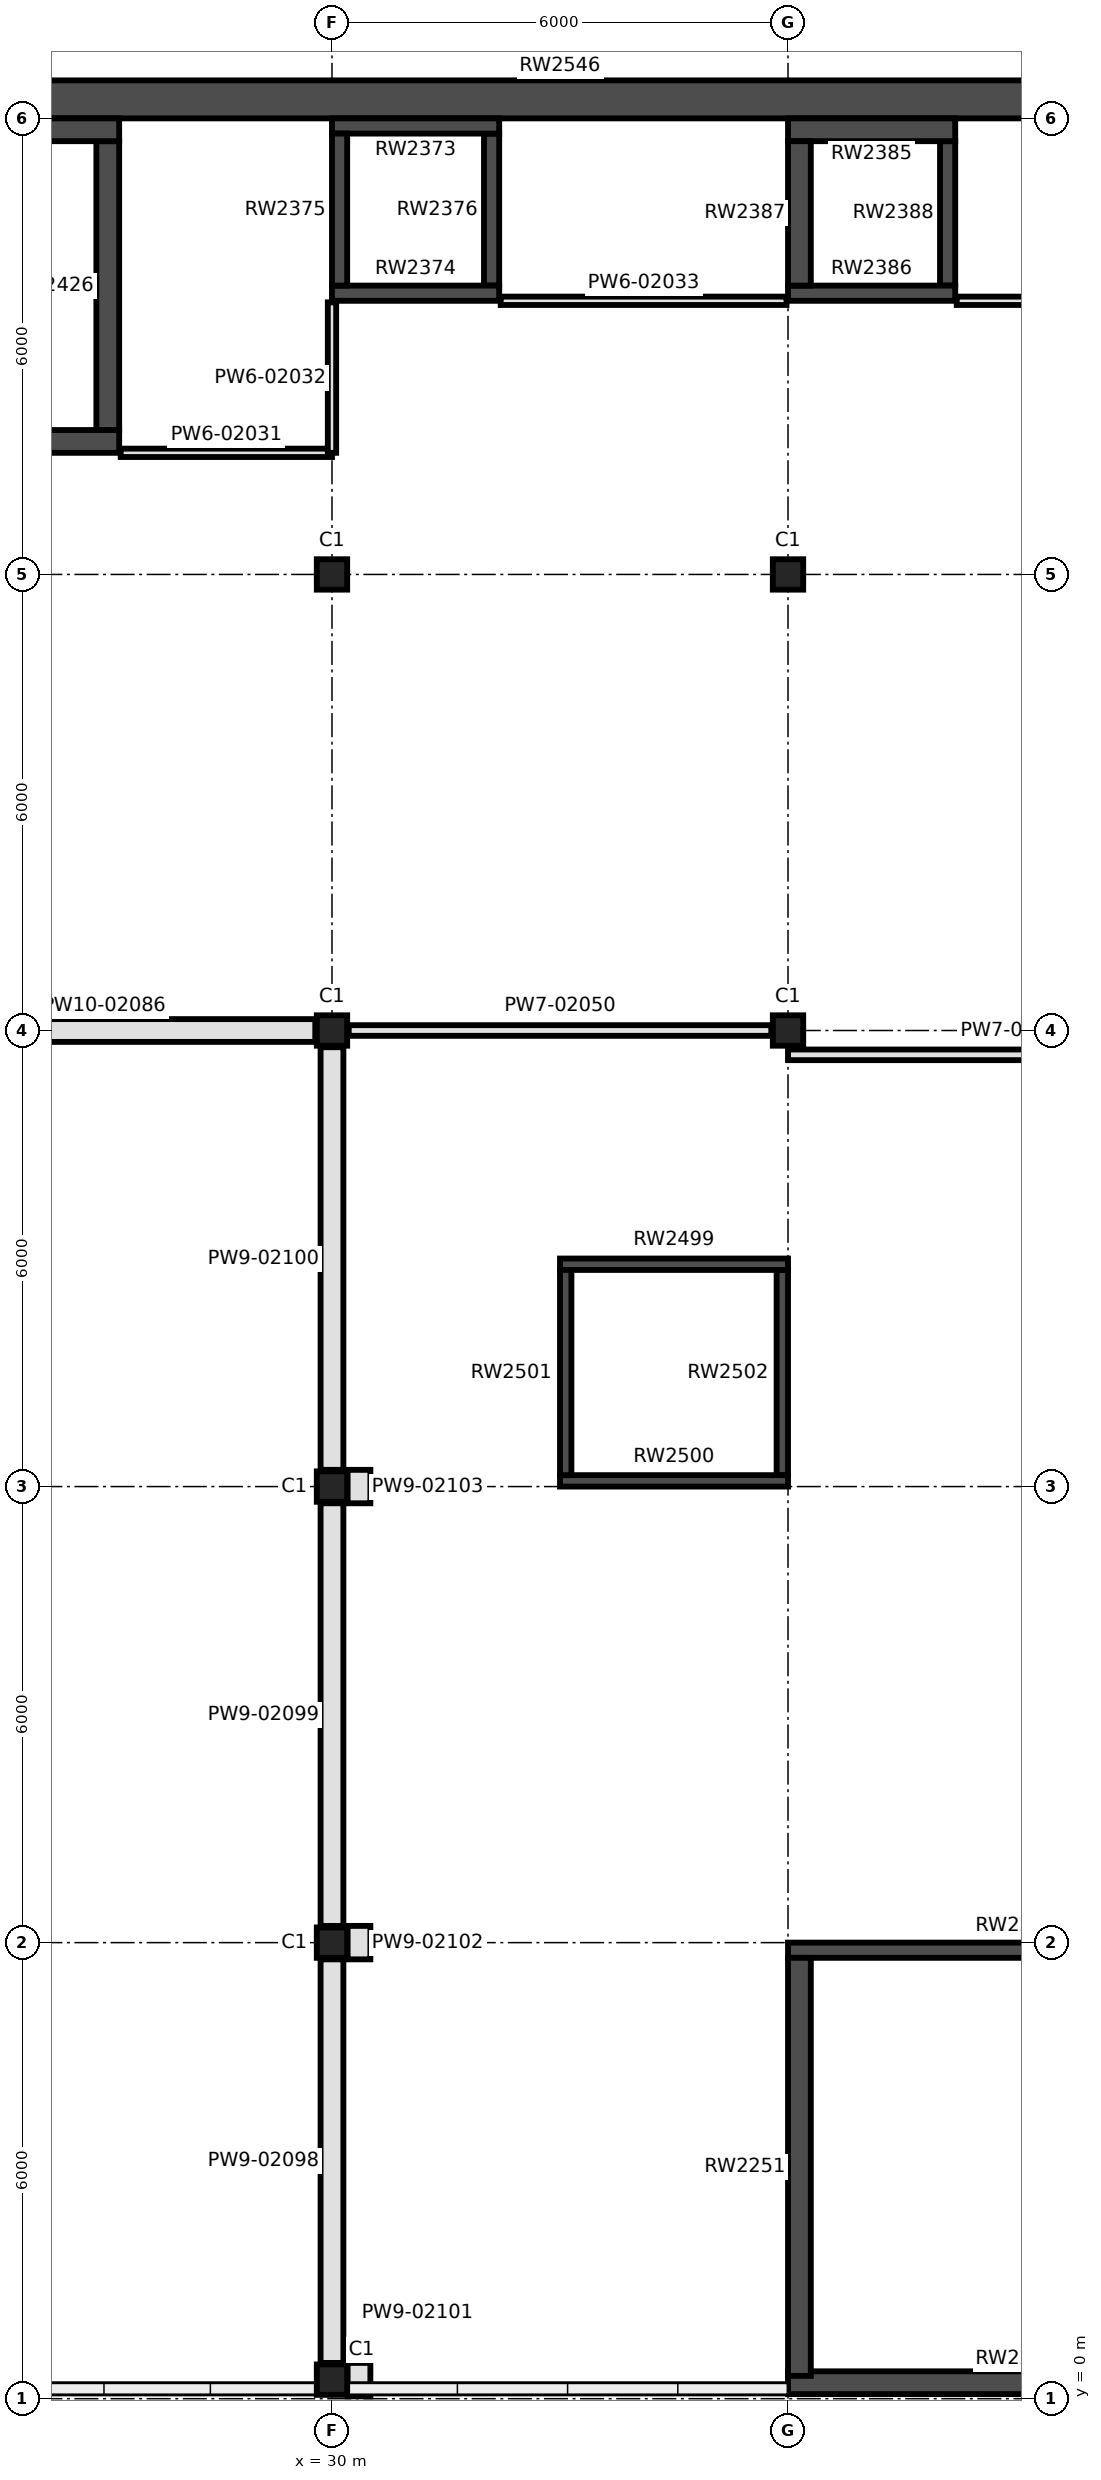
"""IFC4 building model, lengths in metres.
Left out: names, types, materials, properties, quantities, classifications, styles, units other than length and angle.
Written with IfcOpenShell. Run it as: python <this file> out.ifc"""

import sys

from ifc_helpers import new_model, si_unit, direction, frame, frame_2d, origin, origin_2d, place, context, subcontext, project, spatial, rectangle, extrude, element, fill, save


model = new_model("IFC4")
c1 = context("Model", 3, precision=1e-05, world=origin(), true_north=direction((0.0, 1.0)))
c2 = subcontext(c1, "Body", "Model", "MODEL_VIEW")
j1 = project(units=[si_unit("LENGTHUNIT", "METRE"), si_unit("PLANEANGLEUNIT", "RADIAN")], contexts=[c1])
p1 = place(None, origin())
s1 = spatial("IfcSite", under=j1, at=p1, CompositionType="ELEMENT")
p2 = place(p1, origin())
s2 = spatial("IfcBuilding", under=s1, at=p2, CompositionType="ELEMENT")
p3 = place(p2, frame((0.0, 0.0, 12.0)))
s3 = spatial("IfcBuildingStorey", under=s2, at=p3, CompositionType="ELEMENT", Elevation=12.0)
for number, where, z_axis, x_axis in (
    (1, (30.0, 0.25, 0.0), (0.0, 0.0, 1.0), (1.0, 0.0, 0.0)),
    (2, (30.0, 6.0, 0.0), (0.0, 0.0, 1.0), (1.0, 0.0, 0.0)),
    (3, (30.0, 12.0, 0.0), (0.0, 0.0, 1.0), (1.0, 0.0, 0.0)),
    (4, (30.0, 18.0, 0.0), (0.0, 0.0, 1.0), (1.0, 0.0, 0.0)),
    (5, (36.0, 18.0, 0.0), (0.0, 0.0, 1.0), (1.0, 0.0, 0.0)),
    (6, (30.0, 24.0, 0.0), (0.0, 0.0, 1.0), (1.0, 0.0, 0.0)),
    (7, (36.0, 24.0, 0.0), (0.0, 0.0, 1.0), (1.0, 0.0, 0.0)),
):
    element("IfcColumn", number, at=place(p3, frame(where, z_axis=z_axis, x_axis=x_axis)), inside=s3, PredefinedType="COLUMN", context=c2, shape_type="SweptSolid", body=[
        extrude(rectangle(XDim=0.4, YDim=0.4, at=origin_2d()), origin(), (0.0, 0.0, 1.0), 4.5),
    ])
p4 = place(p3, frame((36.0, 5.9, 0.0), z_axis=(0.0, 0.0, 1.0), x_axis=(1.0, 0.0, 0.0)))
e8 = element("IfcWall", 8, at=p4, inside=s3, PredefinedType="SHEAR", context=c2, shape_type="SweptSolid", body=[
    extrude(rectangle(XDim=6.0, YDim=0.2, at=frame_2d((3.0, 0.0))), origin(), (0.0, 0.0, 1.0), 4.5),
])
p5 = place(p4, frame((0.3, 0.0, 0.0)))
e9 = element("IfcOpeningElement", 9, at=p5, cuts=e8, PredefinedType="OPENING", context=c2, shape_type="SweptSolid", body=[
    extrude(rectangle(XDim=1.1, YDim=2.2, at=frame_2d((0.55, 1.1))), frame((0.0, 0.11, 0.0), z_axis=(0.0, -1.0, 0.0), x_axis=(1.0, 0.0, 0.0)), (0.0, 0.0, 1.0), 0.22),
])
p6 = place(p3, frame((36.0, 0.21, 0.0), z_axis=(0.0, 0.0, 1.0), x_axis=(1.0, 0.0, 0.0)))
e10 = element("IfcWall", 10, at=p6, inside=s3, PredefinedType="SHEAR", context=c2, shape_type="SweptSolid", body=[
    extrude(rectangle(XDim=6.0, YDim=0.3, at=frame_2d((3.0, 0.0))), origin(), (0.0, 0.0, 1.0), 4.5),
])
p7 = place(p3, frame((36.15, 0.3, 0.0), z_axis=(0.0, 0.0, 1.0), x_axis=(0.0, 1.0, 0.0)))
e11 = element("IfcWall", 11, at=p7, inside=s3, PredefinedType="SHEAR", context=c2, shape_type="SweptSolid", body=[
    extrude(rectangle(XDim=5.5, YDim=0.3, at=frame_2d((2.75, 0.0))), origin(), (0.0, 0.0, 1.0), 4.5),
])
p8 = place(p7, frame((1.8, 0.0, 0.0)))
e12 = element("IfcOpeningElement", 12, at=p8, cuts=e11, PredefinedType="OPENING", context=c2, shape_type="SweptSolid", body=[
    extrude(rectangle(XDim=1.8, YDim=2.2, at=frame_2d((0.9, 1.1))), frame((0.0, 0.16, 0.0), z_axis=(0.0, -1.0, 0.0), x_axis=(1.0, 0.0, 0.0)), (0.0, 0.0, 1.0), 0.32),
])
p9 = place(p3, frame((30.0, 29.9, 0.0), z_axis=(0.0, 0.0, 1.0), x_axis=(1.0, 0.0, 0.0)))
e13 = element("IfcWall", 13, at=p9, inside=s3, PredefinedType="SHEAR", context=c2, shape_type="SweptSolid", body=[
    extrude(rectangle(XDim=2.2, YDim=0.2, at=frame_2d((1.1, 0.0))), origin(), (0.0, 0.0, 1.0), 4.5),
])
p10 = place(p3, frame((30.0, 27.7, 0.0), z_axis=(0.0, 0.0, 1.0), x_axis=(1.0, 0.0, 0.0)))
e14 = element("IfcWall", 14, at=p10, inside=s3, PredefinedType="SHEAR", context=c2, shape_type="SweptSolid", body=[
    extrude(rectangle(XDim=2.2, YDim=0.2, at=frame_2d((1.1, 0.0))), origin(), (0.0, 0.0, 1.0), 4.5),
])
p11 = place(p10, frame((0.55, 0.0, 0.0)))
e15 = element("IfcOpeningElement", 15, at=p11, cuts=e14, PredefinedType="OPENING", context=c2, shape_type="SweptSolid", body=[
    extrude(rectangle(XDim=1.1, YDim=2.1, at=frame_2d((0.55, 1.05))), frame((0.0, 0.11, 0.0), z_axis=(0.0, -1.0, 0.0), x_axis=(1.0, 0.0, 0.0)), (0.0, 0.0, 1.0), 0.22),
])
for number, where, z_axis, x_axis in (
    (16, (30.1, 27.8, 0.0), (0.0, 0.0, 1.0), (0.0, 1.0, 0.0)),
    (17, (32.1, 27.8, 0.0), (0.0, 0.0, 1.0), (0.0, 1.0, 0.0)),
):
    element("IfcWall", number, at=place(p3, frame(where, z_axis=z_axis, x_axis=x_axis)), inside=s3, PredefinedType="SHEAR", context=c2, shape_type="SweptSolid", body=[
        extrude(rectangle(XDim=2.0, YDim=0.2, at=frame_2d((1.0, 0.0))), origin(), (0.0, 0.0, 1.0), 4.5),
    ])
p12 = place(p3, frame((36.0, 29.85, 0.0), z_axis=(0.0, 0.0, 1.0), x_axis=(1.0, 0.0, 0.0)))
e18 = element("IfcWall", 18, at=p12, inside=s3, PredefinedType="SHEAR", context=c2, shape_type="SweptSolid", body=[
    extrude(rectangle(XDim=2.2, YDim=0.3, at=frame_2d((1.1, 0.0))), origin(), (0.0, 0.0, 1.0), 4.5),
])
p13 = place(p3, frame((36.0, 27.7, 0.0), z_axis=(0.0, 0.0, 1.0), x_axis=(1.0, 0.0, 0.0)))
e19 = element("IfcWall", 19, at=p13, inside=s3, PredefinedType="SHEAR", context=c2, shape_type="SweptSolid", body=[
    extrude(rectangle(XDim=2.2, YDim=0.2, at=frame_2d((1.1, 0.0))), origin(), (0.0, 0.0, 1.0), 4.5),
])
p14 = place(p13, frame((0.55, 0.0, 0.0)))
e20 = element("IfcOpeningElement", 20, at=p14, cuts=e19, PredefinedType="OPENING", context=c2, shape_type="SweptSolid", body=[
    extrude(rectangle(XDim=1.1, YDim=2.1, at=frame_2d((0.55, 1.05))), frame((0.0, 0.11, 0.0), z_axis=(0.0, -1.0, 0.0), x_axis=(1.0, 0.0, 0.0)), (0.0, 0.0, 1.0), 0.22),
])
p15 = place(p3, frame((36.15, 27.8, 0.0), z_axis=(0.0, 0.0, 1.0), x_axis=(0.0, 1.0, 0.0)))
e21 = element("IfcWall", 21, at=p15, inside=s3, PredefinedType="SHEAR", context=c2, shape_type="SweptSolid", body=[
    extrude(rectangle(XDim=1.9, YDim=0.3, at=frame_2d((0.95, 0.0))), origin(), (0.0, 0.0, 1.0), 4.5),
])
p16 = place(p3, frame((38.1, 27.8, 0.0), z_axis=(0.0, 0.0, 1.0), x_axis=(0.0, 1.0, 0.0)))
e22 = element("IfcWall", 22, at=p16, inside=s3, PredefinedType="SHEAR", context=c2, shape_type="SweptSolid", body=[
    extrude(rectangle(XDim=1.9, YDim=0.2, at=frame_2d((0.95, 0.0))), origin(), (0.0, 0.0, 1.0), 4.5),
])
p17 = place(p3, frame((24.0, 29.85, 0.0), z_axis=(0.0, 0.0, 1.0), x_axis=(1.0, 0.0, 0.0)))
e23 = element("IfcWall", 23, at=p17, inside=s3, PredefinedType="SHEAR", context=c2, shape_type="SweptSolid", body=[
    extrude(rectangle(XDim=3.2, YDim=0.3, at=frame_2d((1.6, 0.0))), origin(), (0.0, 0.0, 1.0), 4.5),
])
p18 = place(p3, frame((24.0, 25.75, 0.0), z_axis=(0.0, 0.0, 1.0), x_axis=(1.0, 0.0, 0.0)))
e24 = element("IfcWall", 24, at=p18, inside=s3, PredefinedType="SHEAR", context=c2, shape_type="SweptSolid", body=[
    extrude(rectangle(XDim=3.2, YDim=0.3, at=frame_2d((1.6, 0.0))), origin(), (0.0, 0.0, 1.0), 4.5),
])
p19 = place(p18, frame((0.4, 0.0, 0.0)))
e25 = element("IfcOpeningElement", 25, at=p19, cuts=e24, PredefinedType="OPENING", context=c2, shape_type="SweptSolid", body=[
    extrude(rectangle(XDim=2.4, YDim=2.4, at=frame_2d((1.2, 1.2))), frame((0.0, 0.16, 0.0), z_axis=(0.0, -1.0, 0.0), x_axis=(1.0, 0.0, 0.0)), (0.0, 0.0, 1.0), 0.32),
])
p20 = place(p3, frame((27.05, 25.9, 0.0), z_axis=(0.0, 0.0, 1.0), x_axis=(0.0, 1.0, 0.0)))
e26 = element("IfcWall", 26, at=p20, inside=s3, PredefinedType="SHEAR", context=c2, shape_type="SweptSolid", body=[
    extrude(rectangle(XDim=3.8, YDim=0.3, at=frame_2d((1.9, 0.0))), origin(), (0.0, 0.0, 1.0), 4.5),
])
for number, where, z_axis, x_axis in (
    (27, (33.0, 14.925, 0.0), (0.0, 0.0, 1.0), (1.0, 0.0, 0.0)),
    (28, (33.0, 12.075, 0.0), (0.0, 0.0, 1.0), (1.0, 0.0, 0.0)),
):
    element("IfcWall", number, at=place(p3, frame(where, z_axis=z_axis, x_axis=x_axis)), inside=s3, PredefinedType="SHEAR", context=c2, shape_type="SweptSolid", body=[
        extrude(rectangle(XDim=3.0, YDim=0.15, at=frame_2d((1.5, 0.0))), origin(), (0.0, 0.0, 1.0), 4.5),
    ])
for number, where, z_axis, x_axis in (
    (29, (33.075, 12.15, 0.0), (0.0, 0.0, 1.0), (0.0, 1.0, 0.0)),
    (30, (35.925, 12.15, 0.0), (0.0, 0.0, 1.0), (0.0, 1.0, 0.0)),
):
    element("IfcWall", number, at=place(p3, frame(where, z_axis=z_axis, x_axis=x_axis)), inside=s3, PredefinedType="SHEAR", context=c2, shape_type="SweptSolid", body=[
        extrude(rectangle(XDim=2.7, YDim=0.15, at=frame_2d((1.35, 0.0))), origin(), (0.0, 0.0, 1.0), 4.5),
    ])
p21 = place(p3, frame((18.5, 30.25, 0.0), z_axis=(0.0, 0.0, 1.0), x_axis=(1.0, 0.0, 0.0)))
e31 = element("IfcWall", 31, at=p21, inside=s3, PredefinedType="SHEAR", context=c2, shape_type="SweptSolid", body=[
    extrude(rectangle(XDim=29.0, YDim=0.5, at=frame_2d((14.5, 0.0))), origin(), (0.0, 0.0, 1.0), 4.5),
])
p22 = place(p2, frame((0.0, 0.0, 7.0)))
s4 = spatial("IfcBuildingStorey", under=s2, at=p22, CompositionType="ELEMENT", Elevation=7.0)
p23 = place(p22, frame((29.8, 0.375, 0.0), z_axis=(0.0, 0.0, 1.0), x_axis=(-1.0, 0.0, 0.0)))
e32 = element("IfcWall", 32, at=p23, inside=s4, PredefinedType="SOLIDWALL", context=c2, shape_type="SweptSolid", body=[
    extrude(rectangle(XDim=5.6, YDim=0.25, at=frame_2d((2.8, 0.0))), origin(), (0.0, 0.0, 1.0), 8.9),
])
p24 = place(p3, frame((27.22, 25.6, 0.0), z_axis=(0.0, 0.0, 1.0), x_axis=(1.0, 0.0, 0.0)))
e33 = element("IfcWall", 33, at=p24, inside=s3, PredefinedType="PARTITIONING", context=c2, shape_type="SweptSolid", body=[
    extrude(rectangle(XDim=2.78, YDim=0.11, at=frame_2d((1.39, 0.0))), origin(), (0.0, 0.0, 1.0), 4.28),
])
p25 = place(p24, frame((1.03, 0.0, 0.0)))
e34 = element("IfcOpeningElement", 34, at=p25, cuts=e33, PredefinedType="OPENING", context=c2, shape_type="SweptSolid", body=[
    extrude(rectangle(XDim=0.75, YDim=2.04, at=frame_2d((0.375, 1.02))), frame((0.0, 0.065, 0.0), z_axis=(0.0, -1.0, 0.0), x_axis=(1.0, 0.0, 0.0)), (0.0, 0.0, 1.0), 0.13),
])
p26 = place(p3, frame((30.0, 25.6, 0.0), z_axis=(0.0, 0.0, 1.0), x_axis=(0.0, 1.0, 0.0)))
e35 = element("IfcWall", 35, at=p26, inside=s3, PredefinedType="PARTITIONING", context=c2, shape_type="SweptSolid", body=[
    extrude(rectangle(XDim=1.98, YDim=0.11, at=frame_2d((0.99, 0.0))), origin(), (0.0, 0.0, 1.0), 4.28),
])
p27 = place(p3, frame((32.22, 27.6, 0.0), z_axis=(0.0, 0.0, 1.0), x_axis=(1.0, 0.0, 0.0)))
e36 = element("IfcWall", 36, at=p27, inside=s3, PredefinedType="PARTITIONING", context=c2, shape_type="SweptSolid", body=[
    extrude(rectangle(XDim=3.76, YDim=0.11, at=frame_2d((1.88, 0.0))), origin(), (0.0, 0.0, 1.0), 4.28),
])
p28 = place(p27, frame((1.53, 0.0, 0.0)))
e37 = element("IfcOpeningElement", 37, at=p28, cuts=e36, PredefinedType="OPENING", context=c2, shape_type="SweptSolid", body=[
    extrude(rectangle(XDim=0.75, YDim=2.04, at=frame_2d((0.375, 1.02))), frame((0.0, 0.065, 0.0), z_axis=(0.0, -1.0, 0.0), x_axis=(1.0, 0.0, 0.0)), (0.0, 0.0, 1.0), 0.13),
])
p29 = place(p3, frame((38.22, 27.6, 0.0), z_axis=(0.0, 0.0, 1.0), x_axis=(1.0, 0.0, 0.0)))
e38 = element("IfcWall", 38, at=p29, inside=s3, PredefinedType="PARTITIONING", context=c2, shape_type="SweptSolid", body=[
    extrude(rectangle(XDim=3.78, YDim=0.11, at=frame_2d((1.89, 0.0))), origin(), (0.0, 0.0, 1.0), 4.28),
])
p30 = place(p29, frame((1.53, 0.0, 0.0)))
e39 = element("IfcOpeningElement", 39, at=p30, cuts=e38, PredefinedType="OPENING", context=c2, shape_type="SweptSolid", body=[
    extrude(rectangle(XDim=0.75, YDim=2.04, at=frame_2d((0.375, 1.02))), frame((0.0, 0.065, 0.0), z_axis=(0.0, -1.0, 0.0), x_axis=(1.0, 0.0, 0.0)), (0.0, 0.0, 1.0), 0.13),
])
p31 = place(p3, frame((30.22, 18.0, 0.0), z_axis=(0.0, 0.0, 1.0), x_axis=(1.0, 0.0, 0.0)))
e40 = element("IfcWall", 40, at=p31, inside=s3, PredefinedType="PARTITIONING", context=c2, shape_type="SweptSolid", body=[
    extrude(rectangle(XDim=5.56, YDim=0.14, at=frame_2d((2.78, 0.0))), origin(), (0.0, 0.0, 1.0), 3.9),
])
p32 = place(p31, frame((0.33, 0.0, 0.0)))
e41 = element("IfcOpeningElement", 41, at=p32, cuts=e40, PredefinedType="OPENING", context=c2, shape_type="SweptSolid", body=[
    extrude(rectangle(XDim=1.8, YDim=2.1, at=frame_2d((0.9, 1.05))), frame((0.0, 0.08, 0.0), z_axis=(0.0, -1.0, 0.0), x_axis=(1.0, 0.0, 0.0)), (0.0, 0.0, 1.0), 0.16),
])
p33 = place(p31, frame((3.33, 0.0, 0.0)))
e42 = element("IfcOpeningElement", 42, at=p33, cuts=e40, PredefinedType="OPENING", context=c2, shape_type="SweptSolid", body=[
    extrude(rectangle(XDim=1.8, YDim=2.1, at=frame_2d((0.9, 1.05))), frame((0.0, 0.08, 0.0), z_axis=(0.0, -1.0, 0.0), x_axis=(1.0, 0.0, 0.0)), (0.0, 0.0, 1.0), 0.16),
])
p34 = place(p3, frame((36.0, 17.68, 0.0), z_axis=(0.0, 0.0, 1.0), x_axis=(1.0, 0.0, 0.0)))
e43 = element("IfcWall", 43, at=p34, inside=s3, PredefinedType="PARTITIONING", context=c2, shape_type="SweptSolid", body=[
    extrude(rectangle(XDim=6.0, YDim=0.14, at=frame_2d((3.0, 0.0))), origin(), (0.0, 0.0, 1.0), 4.28),
])
p35 = place(p3, frame((24.22, 18.0, 0.0), z_axis=(0.0, 0.0, 1.0), x_axis=(1.0, 0.0, 0.0)))
e44 = element("IfcWall", 44, at=p35, inside=s3, PredefinedType="PARTITIONING", context=c2, shape_type="SweptSolid", body=[
    extrude(rectangle(XDim=5.56, YDim=0.3, at=frame_2d((2.78, 0.0))), origin(), (0.0, 0.0, 1.0), 3.9),
])
p36 = place(p3, frame((30.0, 0.47, 0.0), z_axis=(0.0, 0.0, 1.0), x_axis=(0.0, 1.0, 0.0)))
e45 = element("IfcWall", 45, at=p36, inside=s3, PredefinedType="PARTITIONING", context=c2, shape_type="SweptSolid", body=[
    extrude(rectangle(XDim=5.31, YDim=0.3, at=frame_2d((2.655, 0.0))), origin(), (0.0, 0.0, 1.0), 3.9),
])
for number, where, z_axis, x_axis in (
    (46, (30.0, 6.22, 0.0), (0.0, 0.0, 1.0), (0.0, 1.0, 0.0)),
    (47, (30.0, 12.22, 0.0), (0.0, 0.0, 1.0), (0.0, 1.0, 0.0)),
):
    element("IfcWall", number, at=place(p3, frame(where, z_axis=z_axis, x_axis=x_axis)), inside=s3, PredefinedType="PARTITIONING", context=c2, shape_type="SweptSolid", body=[
        extrude(rectangle(XDim=5.56, YDim=0.3, at=frame_2d((2.78, 0.0))), origin(), (0.0, 0.0, 1.0), 3.9),
    ])
for number, where, z_axis, x_axis in (
    (48, (30.355, 0.031, 0.0), (0.0, 0.0, 1.0), (0.0, 1.0, 0.0)),
    (49, (30.355, 5.78, 0.0), (0.0, 0.0, 1.0), (0.0, 1.0, 0.0)),
    (50, (30.355, 11.78, 0.0), (0.0, 0.0, 1.0), (0.0, 1.0, 0.0)),
):
    element("IfcWall", number, at=place(p3, frame(where, z_axis=z_axis, x_axis=x_axis)), inside=s3, PredefinedType="PARTITIONING", context=c2, shape_type="SweptSolid", body=[
        extrude(rectangle(XDim=0.44, YDim=0.3, at=frame_2d((0.22, 0.0))), origin(), (0.0, 0.0, 1.0), 4.28),
    ])
p37 = place(p8, frame((1.8, 0.0, 0.0), z_axis=(0.0, 0.0, 1.0), x_axis=(-1.0, 0.0, 0.0)))
e51 = element("IfcDoor", 51, at=p37, inside=s3, OperationType="DOUBLE_DOOR_SINGLE_SWING", PredefinedType="DOOR", context=c2, shape_type="SweptSolid", body=[
    extrude(rectangle(XDim=1.8, YDim=2.2, at=frame_2d((0.9, 1.1))), frame((0.0, 0.025, 0.0), z_axis=(0.0, -1.0, 0.0), x_axis=(1.0, 0.0, 0.0)), (0.0, 0.0, 1.0), 0.05),
])
fill(e12, e51)
p38 = place(p5, frame((1.1, 0.0, 0.0), z_axis=(0.0, 0.0, 1.0), x_axis=(-1.0, 0.0, 0.0)))
e52 = element("IfcDoor", 52, at=p38, inside=s3, OperationType="SINGLE_SWING_LEFT", PredefinedType="DOOR", context=c2, shape_type="SweptSolid", body=[
    extrude(rectangle(XDim=1.1, YDim=2.2, at=frame_2d((0.55, 1.1))), frame((0.0, 0.025, 0.0), z_axis=(0.0, -1.0, 0.0), x_axis=(1.0, 0.0, 0.0)), (0.0, 0.0, 1.0), 0.05),
])
fill(e9, e52)
p39 = place(p28, origin())
e53 = element("IfcDoor", 53, at=p39, inside=s3, OperationType="SINGLE_SWING_LEFT", PredefinedType="DOOR", context=c2, shape_type="SweptSolid", body=[
    extrude(rectangle(XDim=0.75, YDim=2.04, at=frame_2d((0.375, 1.02))), frame((0.0, 0.025, 0.0), z_axis=(0.0, -1.0, 0.0), x_axis=(1.0, 0.0, 0.0)), (0.0, 0.0, 1.0), 0.05),
])
fill(e37, e53)
p40 = place(p25, origin())
e54 = element("IfcDoor", 54, at=p40, inside=s3, OperationType="SINGLE_SWING_LEFT", PredefinedType="DOOR", context=c2, shape_type="SweptSolid", body=[
    extrude(rectangle(XDim=0.75, YDim=2.04, at=frame_2d((0.375, 1.02))), frame((0.0, 0.025, 0.0), z_axis=(0.0, -1.0, 0.0), x_axis=(1.0, 0.0, 0.0)), (0.0, 0.0, 1.0), 0.05),
])
fill(e34, e54)
p41 = place(p32, origin())
e55 = element("IfcDoor", 55, at=p41, inside=s3, OperationType="DOUBLE_DOOR_SINGLE_SWING", PredefinedType="DOOR", context=c2, shape_type="SweptSolid", body=[
    extrude(rectangle(XDim=1.8, YDim=2.1, at=frame_2d((0.9, 1.05))), frame((0.0, 0.025, 0.0), z_axis=(0.0, -1.0, 0.0), x_axis=(1.0, 0.0, 0.0)), (0.0, 0.0, 1.0), 0.05),
])
fill(e41, e55)
p42 = place(p33, origin())
e56 = element("IfcDoor", 56, at=p42, inside=s3, OperationType="DOUBLE_DOOR_SINGLE_SWING", PredefinedType="DOOR", context=c2, shape_type="SweptSolid", body=[
    extrude(rectangle(XDim=1.8, YDim=2.1, at=frame_2d((0.9, 1.05))), frame((0.0, 0.025, 0.0), z_axis=(0.0, -1.0, 0.0), x_axis=(1.0, 0.0, 0.0)), (0.0, 0.0, 1.0), 0.05),
])
fill(e42, e56)
p43 = place(p11, origin())
e57 = element("IfcDoor", 57, at=p43, inside=s3, OperationType="DOUBLE_DOOR_SLIDING", PredefinedType="DOOR", context=c2, shape_type="SweptSolid", body=[
    extrude(rectangle(XDim=1.1, YDim=2.1, at=frame_2d((0.55, 1.05))), frame((0.0, 0.025, 0.0), z_axis=(0.0, -1.0, 0.0), x_axis=(1.0, 0.0, 0.0)), (0.0, 0.0, 1.0), 0.05),
])
fill(e15, e57)
p44 = place(p14, origin())
e58 = element("IfcDoor", 58, at=p44, inside=s3, OperationType="DOUBLE_DOOR_SLIDING", PredefinedType="DOOR", context=c2, shape_type="SweptSolid", body=[
    extrude(rectangle(XDim=1.1, YDim=2.1, at=frame_2d((0.55, 1.05))), frame((0.0, 0.025, 0.0), z_axis=(0.0, -1.0, 0.0), x_axis=(1.0, 0.0, 0.0)), (0.0, 0.0, 1.0), 0.05),
])
fill(e20, e58)
p45 = place(p19, origin())
e59 = element("IfcDoor", 59, at=p45, inside=s3, OperationType="DOUBLE_DOOR_SLIDING", PredefinedType="DOOR", context=c2, shape_type="SweptSolid", body=[
    extrude(rectangle(XDim=2.4, YDim=2.4, at=frame_2d((1.2, 1.2))), frame((0.0, 0.025, 0.0), z_axis=(0.0, -1.0, 0.0), x_axis=(1.0, 0.0, 0.0)), (0.0, 0.0, 1.0), 0.05),
])
fill(e25, e59)
save(model, sys.argv[1])
